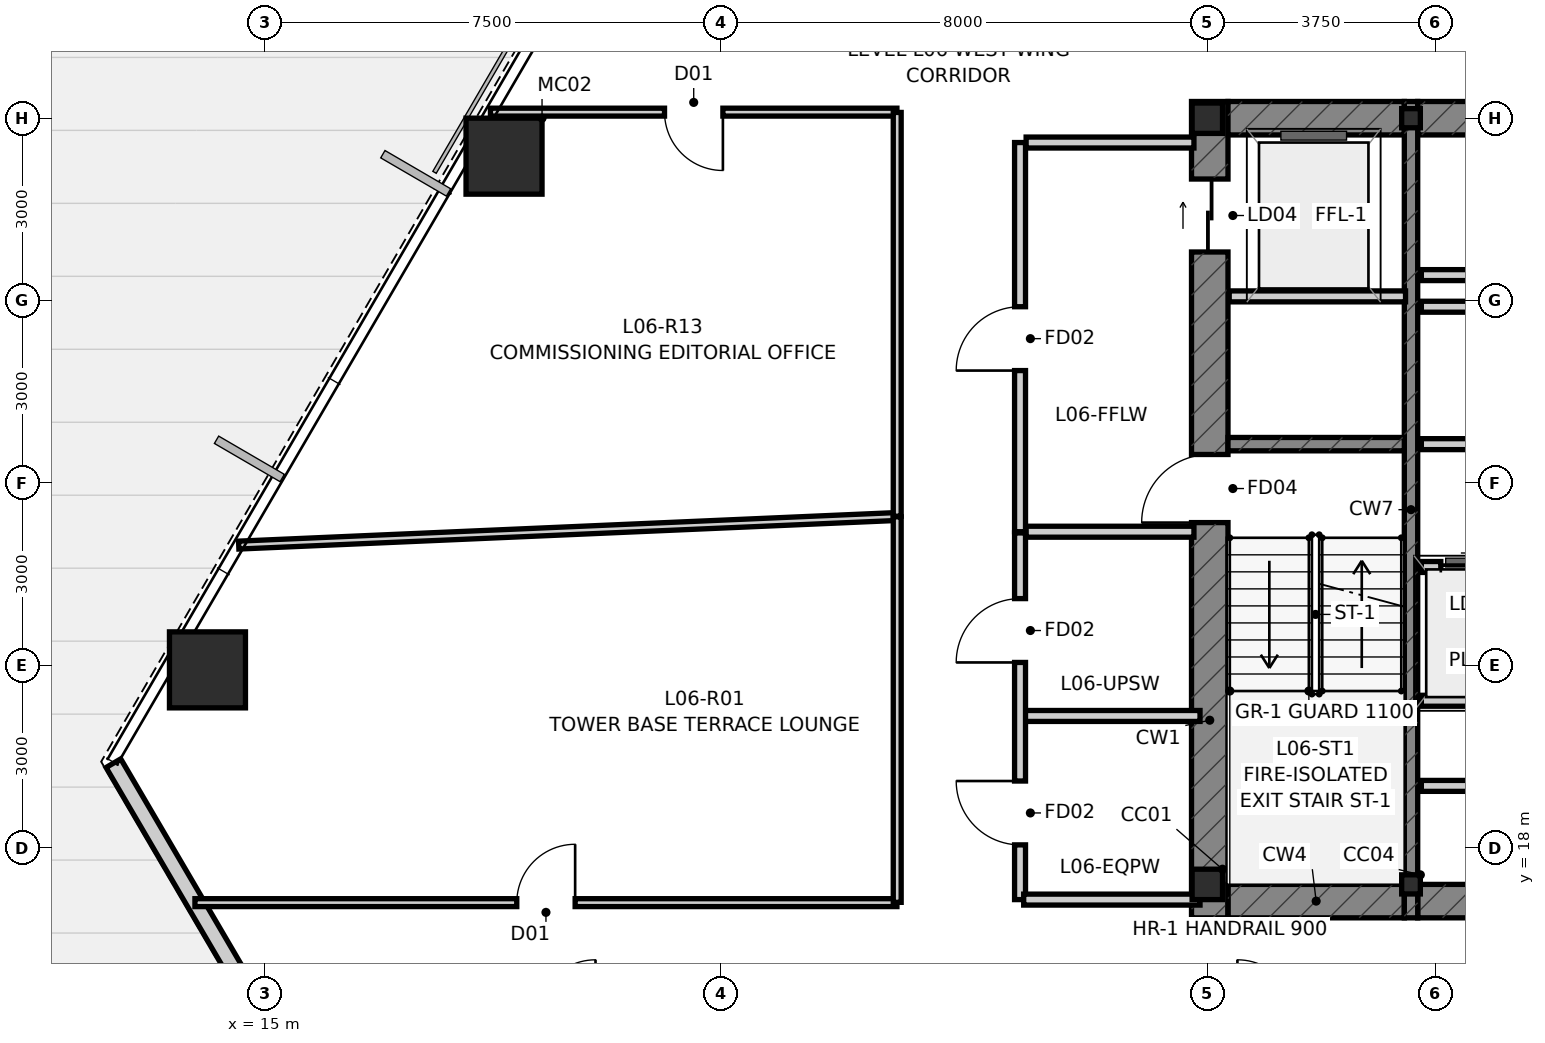
"""IFC4 building model, lengths in metres.
Left out: names, types, materials, properties, quantities, classifications, styles, units other than length and angle.
Written with IfcOpenShell. Run it as: python <this file> out.ifc"""

import sys

from ifc_helpers import new_model, si_unit, direction, frame, frame_2d, origin, origin_2d, place, context, subcontext, project, spatial, rectangle, hollow_rectangle, i_section, extrude, source, transform, mapped, element, fill, save


model = new_model("IFC4")
c1 = context("Model", 3, precision=1e-05, world=origin(), true_north=direction((0.0, 1.0)))
c2 = subcontext(c1, "Body", "Model", "MODEL_VIEW")
j1 = project(units=[si_unit("LENGTHUNIT", "METRE"), si_unit("PLANEANGLEUNIT", "RADIAN")], contexts=[c1])
p1 = place(None, origin())
s1 = spatial("IfcSite", under=j1, at=p1, CompositionType="ELEMENT")
p2 = place(p1, origin())
s2 = spatial("IfcBuilding", under=s1, at=p2, CompositionType="ELEMENT")
p3 = place(p2, frame((0.0, 0.0, 27.6)))
s3 = spatial("IfcBuildingStorey", under=s2, at=p3, CompositionType="ELEMENT", Elevation=27.6)
m1 = source(origin(), c2, "Body", "SweptSolid", [
    extrude(i_section(OverallWidth=0.5, OverallDepth=0.5, WebThickness=0.028, FlangeThickness=0.04, at=origin_2d()), origin(), (0.0, 0.0, 1.0), 3.65),
])
for number, where, z_axis, x_axis in (
    (1, (30.5, 17.4, 0.0), (0.0, 0.0, 1.0), (1.0, 0.0, 0.0)),
    (2, (30.5, 30.0, 0.0), (0.0, 0.0, 1.0), (1.0, 0.0, 0.0)),
):
    element("IfcColumn", number, at=place(p3, frame(where, z_axis=z_axis, x_axis=x_axis)), inside=s3, PredefinedType="COLUMN", context=c2, shape_type="MappedRepresentation", body=[
        mapped(m1, transform((0.0, 0.0, 0.0), scale=1.0)),
    ])
m2 = source(origin(), c2, "Body", "SweptSolid", [
    extrude(i_section(OverallWidth=0.307, OverallDepth=0.315, WebThickness=0.012, FlangeThickness=0.019, at=origin_2d()), origin(), (0.0, 0.0, 1.0), 3.65),
])
for number, where, z_axis, x_axis in (
    (3, (33.85, 17.4, 0.0), (0.0, 0.0, 1.0), (1.0, 0.0, 0.0)),
    (4, (33.85, 30.0, 0.0), (0.0, 0.0, 1.0), (1.0, 0.0, 0.0)),
):
    element("IfcColumn", number, at=place(p3, frame(where, z_axis=z_axis, x_axis=x_axis)), inside=s3, PredefinedType="COLUMN", context=c2, shape_type="MappedRepresentation", body=[
        mapped(m2, transform((0.0, 0.0, 0.0), scale=1.0)),
    ])
p4 = place(p3, frame((30.54, 16.85, 0.0), z_axis=(0.0, 0.0, 1.0), x_axis=(0.0, 1.0, 0.0)))
e5 = element("IfcWall", 5, at=p4, inside=s3, PredefinedType="SHEAR", context=c2, shape_type="SweptSolid", body=[
    extrude(rectangle(XDim=13.425, YDim=0.6, at=frame_2d((6.712, 0.0))), origin(), (0.0, 0.0, 1.0), 3.65),
])
p5 = place(p4, frame((6.5, 0.0, 0.0)))
e6 = element("IfcOpeningElement", 6, at=p5, cuts=e5, PredefinedType="OPENING", context=c2, shape_type="SweptSolid", body=[
    extrude(rectangle(XDim=1.12, YDim=2.15, at=frame_2d((0.56, 1.075))), frame((0.0, 0.312, 0.0), z_axis=(0.0, -1.0, 0.0), x_axis=(1.0, 0.0, 0.0)), (0.0, 0.0, 1.0), 0.624),
])
p6 = place(p4, frame((10.95, 0.0, 0.0)))
e7 = element("IfcOpeningElement", 7, at=p6, cuts=e5, PredefinedType="OPENING", context=c2, shape_type="SweptSolid", body=[
    extrude(rectangle(XDim=1.2, YDim=2.2, at=frame_2d((0.6, 1.1))), frame((0.0, 0.312, 0.0), z_axis=(0.0, -1.0, 0.0), x_axis=(1.0, 0.0, 0.0)), (0.0, 0.0, 1.0), 0.624),
])
p7 = place(p3, frame((30.84, 17.125, 0.0), z_axis=(0.0, 0.0, 1.0), x_axis=(1.0, 0.0, 0.0)))
e8 = element("IfcWall", 8, at=p7, inside=s3, PredefinedType="SHEAR", context=c2, shape_type="SweptSolid", body=[
    extrude(rectangle(XDim=2.9, YDim=0.55, at=frame_2d((1.45, 0.0))), origin(), (0.0, 0.0, 1.0), 3.65),
])
p8 = place(p3, frame((33.96, 17.125, 0.0), z_axis=(0.0, 0.0, 1.0), x_axis=(1.0, 0.0, 0.0)))
e9 = element("IfcWall", 9, at=p8, inside=s3, PredefinedType="SHEAR", context=c2, shape_type="SweptSolid", body=[
    extrude(rectangle(XDim=8.08, YDim=0.55, at=frame_2d((4.04, 0.0))), origin(), (0.0, 0.0, 1.0), 3.65),
])
p9 = place(p3, frame((30.84, 30.0, 0.0), z_axis=(0.0, 0.0, 1.0), x_axis=(1.0, 0.0, 0.0)))
e10 = element("IfcWall", 10, at=p9, inside=s3, PredefinedType="SHEAR", context=c2, shape_type="SweptSolid", body=[
    extrude(rectangle(XDim=2.9, YDim=0.55, at=frame_2d((1.45, 0.0))), origin(), (0.0, 0.0, 1.0), 3.65),
])
p10 = place(p3, frame((33.96, 30.0, 0.0), z_axis=(0.0, 0.0, 1.0), x_axis=(1.0, 0.0, 0.0)))
e11 = element("IfcWall", 11, at=p10, inside=s3, PredefinedType="SHEAR", context=c2, shape_type="SweptSolid", body=[
    extrude(rectangle(XDim=3.78, YDim=0.55, at=frame_2d((1.89, 0.0))), origin(), (0.0, 0.0, 1.0), 3.65),
])
p11 = place(p3, frame((33.85, 16.85, 0.0), z_axis=(0.0, 0.0, 1.0), x_axis=(0.0, 1.0, 0.0)))
e12 = element("IfcWall", 12, at=p11, inside=s3, PredefinedType="SHEAR", context=c2, shape_type="SweptSolid", body=[
    extrude(rectangle(XDim=13.425, YDim=0.22, at=frame_2d((6.712, 0.0))), origin(), (0.0, 0.0, 1.0), 3.65),
])
p12 = place(p3, frame((30.84, 24.64, 0.0), z_axis=(0.0, 0.0, 1.0), x_axis=(1.0, 0.0, 0.0)))
e13 = element("IfcWall", 13, at=p12, inside=s3, PredefinedType="SHEAR", context=c2, shape_type="SweptSolid", body=[
    extrude(rectangle(XDim=2.9, YDim=0.22, at=frame_2d((1.45, 0.0))), origin(), (0.0, 0.0, 1.0), 3.65),
])
m3 = source(origin(), c2, "Body", "SweptSolid", [
    extrude(hollow_rectangle(XDim=1.25, YDim=1.25, WallThickness=0.07, at=origin_2d()), origin(), (0.0, 0.0, 1.0), 3.651),
])
p13 = place(p3, frame((18.934, 29.376, 0.0), z_axis=(0.014913313399, -0.013776424037, 0.999793880369), x_axis=(0.678553674548, 0.734550822447, 0.0)))
e14 = element("IfcColumn", 14, at=p13, inside=s3, PredefinedType="COLUMN", context=c2, shape_type="MappedRepresentation", body=[
    mapped(m3, transform((0.0, 0.0, 0.0), scale=1.0)),
])
m4 = source(origin(), c2, "Body", "SweptSolid", [
    extrude(hollow_rectangle(XDim=1.25, YDim=1.25, WallThickness=0.07, at=origin_2d()), origin(), (0.0, 0.0, 1.0), 3.651),
])
p14 = place(p3, frame((14.056, 20.928, 0.0), z_axis=(0.010431795422, -0.021532295679, 0.999713727968), x_axis=(0.899947055326, 0.435999194506, 0.0)))
e15 = element("IfcColumn", 15, at=p14, inside=s3, PredefinedType="COLUMN", context=c2, shape_type="MappedRepresentation", body=[
    mapped(m4, transform((0.0, 0.0, 0.0), scale=1.0)),
])
p15 = place(p3, frame((21.466, 4.107, 0.0), z_axis=(0.0, 0.0, 1.0), x_axis=(-0.505539127034, 0.862803680473, 0.0)))
e16 = element("IfcWall", 16, at=p15, inside=s3, PredefinedType="STANDARD", context=c2, shape_type="SweptSolid", body=[
    extrude(rectangle(XDim=17.717, YDim=0.28, at=frame_2d((8.858, 0.0))), origin(), (0.0, 0.0, 1.0), 3.4),
])
p16 = place(p15, frame((7.96, 0.0, 0.9)))
e17 = element("IfcOpeningElement", 17, at=p16, cuts=e16, PredefinedType="OPENING", context=c2, shape_type="SweptSolid", body=[
    extrude(rectangle(XDim=1.8, YDim=1.8, at=frame_2d((0.9, 0.9))), frame((0.0, 0.152, 0.0), z_axis=(0.0, -1.0, 0.0), x_axis=(1.0, 0.0, 0.0)), (0.0, 0.0, 1.0), 0.304),
])
p17 = place(p3, frame((34.02, 22.62, 0.0), z_axis=(0.0, 0.0, 1.0), x_axis=(1.0, 0.0, 0.0)))
e18 = element("IfcWall", 18, at=p17, inside=s3, PredefinedType="PARTITIONING", context=c2, shape_type="SweptSolid", body=[
    extrude(rectangle(XDim=3.6, YDim=0.18, at=frame_2d((1.8, 0.0))), origin(), (0.0, 0.0, 1.0), 3.4),
])
p18 = place(p17, frame((0.32, 0.0, 0.0)))
e19 = element("IfcOpeningElement", 19, at=p18, cuts=e18, PredefinedType="OPENING", context=c2, shape_type="SweptSolid", body=[
    extrude(rectangle(XDim=1.1, YDim=2.2, at=frame_2d((0.55, 1.1))), frame((0.0, 0.102, 0.0), z_axis=(0.0, -1.0, 0.0), x_axis=(1.0, 0.0, 0.0)), (0.0, 0.0, 1.0), 0.204),
])
p19 = place(p17, frame((2.12, 0.0, 0.0)))
e20 = element("IfcOpeningElement", 20, at=p19, cuts=e18, PredefinedType="OPENING", context=c2, shape_type="SweptSolid", body=[
    extrude(rectangle(XDim=1.1, YDim=2.2, at=frame_2d((0.55, 1.1))), frame((0.0, 0.102, 0.0), z_axis=(0.0, -1.0, 0.0), x_axis=(1.0, 0.0, 0.0)), (0.0, 0.0, 1.0), 0.204),
])
p20 = place(p3, frame((34.02, 26.9, 0.0), z_axis=(0.0, 0.0, 1.0), x_axis=(1.0, 0.0, 0.0)))
e21 = element("IfcWall", 21, at=p20, inside=s3, PredefinedType="PARTITIONING", context=c2, shape_type="SweptSolid", body=[
    extrude(rectangle(XDim=3.6, YDim=0.18, at=frame_2d((1.8, 0.0))), origin(), (0.0, 0.0, 1.0), 3.4),
])
p21 = place(p3, frame((34.02, 24.64, 0.0), z_axis=(0.0, 0.0, 1.0), x_axis=(1.0, 0.0, 0.0)))
e22 = element("IfcWall", 22, at=p21, inside=s3, PredefinedType="PARTITIONING", context=c2, shape_type="SweptSolid", body=[
    extrude(rectangle(XDim=3.68, YDim=0.18, at=frame_2d((1.84, 0.0))), origin(), (0.0, 0.0, 1.0), 3.4),
])
p22 = place(p3, frame((34.02, 27.42, 0.0), z_axis=(0.0, 0.0, 1.0), x_axis=(1.0, 0.0, 0.0)))
e23 = element("IfcWall", 23, at=p22, inside=s3, PredefinedType="PARTITIONING", context=c2, shape_type="SweptSolid", body=[
    extrude(rectangle(XDim=3.66, YDim=0.18, at=frame_2d((1.83, 0.0))), origin(), (0.0, 0.0, 1.0), 3.4),
])
p23 = place(p3, frame((27.42, 23.2, 0.0), z_axis=(0.0, 0.0, 1.0), x_axis=(0.0, 1.0, 0.0)))
e24 = element("IfcWall", 24, at=p23, inside=s3, PredefinedType="PARTITIONING", context=c2, shape_type="SweptSolid", body=[
    extrude(rectangle(XDim=6.4, YDim=0.18, at=frame_2d((3.2, 0.0))), origin(), (0.0, 0.0, 1.0), 3.4),
])
p24 = place(p23, frame((2.65, 0.0, 0.0)))
e25 = element("IfcOpeningElement", 25, at=p24, cuts=e24, PredefinedType="OPENING", context=c2, shape_type="SweptSolid", body=[
    extrude(rectangle(XDim=1.05, YDim=2.15, at=frame_2d((0.525, 1.075))), frame((0.0, 0.102, 0.0), z_axis=(0.0, -1.0, 0.0), x_axis=(1.0, 0.0, 0.0)), (0.0, 0.0, 1.0), 0.204),
])
p25 = place(p3, frame((27.52, 23.2, 0.0), z_axis=(0.0, 0.0, 1.0), x_axis=(1.0, 0.0, 0.0)))
e26 = element("IfcWall", 26, at=p25, inside=s3, PredefinedType="PARTITIONING", context=c2, shape_type="SweptSolid", body=[
    extrude(rectangle(XDim=2.76, YDim=0.18, at=frame_2d((1.38, 0.0))), origin(), (0.0, 0.0, 1.0), 3.4),
])
p26 = place(p3, frame((27.52, 29.6, 0.0), z_axis=(0.0, 0.0, 1.0), x_axis=(1.0, 0.0, 0.0)))
e27 = element("IfcWall", 27, at=p26, inside=s3, PredefinedType="PARTITIONING", context=c2, shape_type="SweptSolid", body=[
    extrude(rectangle(XDim=2.76, YDim=0.18, at=frame_2d((1.38, 0.0))), origin(), (0.0, 0.0, 1.0), 2.783),
])
p27 = place(p3, frame((30.86, 27.07, 0.0), z_axis=(0.0, 0.0, 1.0), x_axis=(1.0, 0.0, 0.0)))
e28 = element("IfcWall", 28, at=p27, inside=s3, PredefinedType="PARTITIONING", context=c2, shape_type="SweptSolid", body=[
    extrude(rectangle(XDim=2.9, YDim=0.18, at=frame_2d((1.45, 0.0))), origin(), (0.0, 0.0, 1.0), 3.4),
])
p28 = place(p3, frame((34.02, 20.42, 0.0), z_axis=(0.0, 0.0, 1.0), x_axis=(1.0, 0.0, 0.0)))
e29 = element("IfcWall", 29, at=p28, inside=s3, PredefinedType="PARTITIONING", context=c2, shape_type="SweptSolid", body=[
    extrude(rectangle(XDim=3.64, YDim=0.18, at=frame_2d((1.82, 0.0))), origin(), (0.0, 0.0, 1.0), 3.4),
])
p29 = place(p3, frame((34.02, 19.02, 0.0), z_axis=(0.0, 0.0, 1.0), x_axis=(1.0, 0.0, 0.0)))
e30 = element("IfcWall", 30, at=p29, inside=s3, PredefinedType="PARTITIONING", context=c2, shape_type="SweptSolid", body=[
    extrude(rectangle(XDim=3.58, YDim=0.18, at=frame_2d((1.79, 0.0))), origin(), (0.0, 0.0, 1.0), 3.4),
])
p30 = place(p3, frame((27.48, 20.17, 0.0), z_axis=(0.0, 0.0, 1.0), x_axis=(1.0, 0.0, 0.0)))
e31 = element("IfcWall", 31, at=p30, inside=s3, PredefinedType="PARTITIONING", context=c2, shape_type="SweptSolid", body=[
    extrude(rectangle(XDim=2.9, YDim=0.18, at=frame_2d((1.45, 0.0))), origin(), (0.0, 0.0, 1.0), 3.4),
])
p31 = place(p3, frame((27.42, 17.15, 0.0), z_axis=(0.0, 0.0, 1.0), x_axis=(0.0, 1.0, 0.0)))
e32 = element("IfcWall", 32, at=p31, inside=s3, PredefinedType="PARTITIONING", context=c2, shape_type="SweptSolid", body=[
    extrude(rectangle(XDim=6.03, YDim=0.18, at=frame_2d((3.015, 0.0))), origin(), (0.0, 0.0, 1.0), 3.026),
])
p32 = place(p31, frame((0.9, 0.0, 0.0)))
e33 = element("IfcOpeningElement", 33, at=p32, cuts=e32, PredefinedType="OPENING", context=c2, shape_type="SweptSolid", body=[
    extrude(rectangle(XDim=1.05, YDim=2.15, at=frame_2d((0.525, 1.075))), frame((0.0, 0.102, 0.0), z_axis=(0.0, -1.0, 0.0), x_axis=(1.0, 0.0, 0.0)), (0.0, 0.0, 1.0), 0.204),
])
p33 = place(p31, frame((3.9, 0.0, 0.0)))
e34 = element("IfcOpeningElement", 34, at=p33, cuts=e32, PredefinedType="OPENING", context=c2, shape_type="SweptSolid", body=[
    extrude(rectangle(XDim=1.05, YDim=2.15, at=frame_2d((0.525, 1.075))), frame((0.0, 0.102, 0.0), z_axis=(0.0, -1.0, 0.0), x_axis=(1.0, 0.0, 0.0)), (0.0, 0.0, 1.0), 0.204),
])
p34 = place(p3, frame((27.48, 17.15, 0.0), z_axis=(0.0, 0.0, 1.0), x_axis=(1.0, 0.0, 0.0)))
e35 = element("IfcWall", 35, at=p34, inside=s3, PredefinedType="PARTITIONING", context=c2, shape_type="SweptSolid", body=[
    extrude(rectangle(XDim=2.9, YDim=0.18, at=frame_2d((1.45, 0.0))), origin(), (0.0, 0.0, 1.0), 2.783),
])
p35 = place(p3, frame((13.85, 17.1, 0.0), z_axis=(0.0, 0.0, 1.0), x_axis=(1.0, 0.0, 0.0)))
e36 = element("IfcWall", 36, at=p35, inside=s3, PredefinedType="PARTITIONING", context=c2, shape_type="SweptSolid", body=[
    extrude(rectangle(XDim=11.545, YDim=0.13, at=frame_2d((5.772, 0.0))), origin(), (0.0, 0.0, 1.0), 3.4),
])
p36 = place(p35, frame((5.293, 0.0, 0.0)))
e37 = element("IfcOpeningElement", 37, at=p36, cuts=e36, PredefinedType="OPENING", context=c2, shape_type="SweptSolid", body=[
    extrude(rectangle(XDim=0.96, YDim=2.15, at=frame_2d((0.48, 1.075))), frame((0.0, 0.077, 0.0), z_axis=(0.0, -1.0, 0.0), x_axis=(1.0, 0.0, 0.0)), (0.0, 0.0, 1.0), 0.154),
])
p37 = place(p3, frame((14.57, 22.98, 0.0), z_axis=(0.0, 0.0, 1.0), x_axis=(0.999058877274, 0.043374643965, 0.0)))
e38 = element("IfcWall", 38, at=p37, inside=s3, PredefinedType="PARTITIONING", context=c2, shape_type="SweptSolid", body=[
    extrude(rectangle(XDim=10.835, YDim=0.13, at=frame_2d((5.417, 0.0))), origin(), (0.0, 0.0, 1.0), 3.4),
])
p38 = place(p3, frame((25.395, 30.1, 0.0), z_axis=(0.0, 0.0, 1.0), x_axis=(-1.0, 0.0, 0.0)))
e39 = element("IfcWall", 39, at=p38, inside=s3, PredefinedType="PARTITIONING", context=c2, shape_type="SweptSolid", body=[
    extrude(rectangle(XDim=6.685, YDim=0.13, at=frame_2d((3.343, 0.0))), origin(), (0.0, 0.0, 1.0), 2.783),
])
p39 = place(p38, frame((2.862, 0.0, 0.0)))
e40 = element("IfcOpeningElement", 40, at=p39, cuts=e39, PredefinedType="OPENING", context=c2, shape_type="SweptSolid", body=[
    extrude(rectangle(XDim=0.96, YDim=2.15, at=frame_2d((0.48, 1.075))), frame((0.0, 0.077, 0.0), z_axis=(0.0, -1.0, 0.0), x_axis=(1.0, 0.0, 0.0)), (0.0, 0.0, 1.0), 0.154),
])
p40 = place(p3, frame((25.4, 23.455, 0.0), z_axis=(0.0, 0.0, 1.0), x_axis=(0.0, 1.0, 0.0)))
e41 = element("IfcWall", 41, at=p40, inside=s3, PredefinedType="PARTITIONING", context=c2, shape_type="SweptSolid", body=[
    extrude(rectangle(XDim=6.64, YDim=0.13, at=frame_2d((3.32, 0.0))), origin(), (0.0, 0.0, 1.0), 3.026),
])
p41 = place(p3, frame((25.4, 17.105, 0.0), z_axis=(0.0, 0.0, 1.0), x_axis=(0.0, 1.0, 0.0)))
e42 = element("IfcWall", 42, at=p41, inside=s3, PredefinedType="PARTITIONING", context=c2, shape_type="SweptSolid", body=[
    extrude(rectangle(XDim=6.34, YDim=0.13, at=frame_2d((3.17, 0.0))), origin(), (0.0, 0.0, 1.0), 3.026),
])
p42 = place(p5, origin())
e43 = element("IfcDoor", 43, at=p42, inside=s3, OperationType="SINGLE_SWING_LEFT", PredefinedType="DOOR", context=c2, shape_type="SweptSolid", body=[
    extrude(rectangle(XDim=1.12, YDim=2.15, at=frame_2d((0.56, 1.075))), frame((0.0, 0.025, 0.0), z_axis=(0.0, -1.0, 0.0), x_axis=(1.0, 0.0, 0.0)), (0.0, 0.0, 1.0), 0.05),
])
fill(e6, e43)
p43 = place(p6, origin())
e44 = element("IfcDoor", 44, at=p43, inside=s3, OperationType="SLIDING_TO_LEFT", PredefinedType="DOOR", context=c2, shape_type="SweptSolid", body=[
    extrude(rectangle(XDim=1.2, YDim=2.2, at=frame_2d((0.6, 1.1))), frame((0.0, 0.025, 0.0), z_axis=(0.0, -1.0, 0.0), x_axis=(1.0, 0.0, 0.0)), (0.0, 0.0, 1.0), 0.05),
])
fill(e7, e44)
p44 = place(p18, origin())
e45 = element("IfcDoor", 45, at=p44, inside=s3, OperationType="SLIDING_TO_LEFT", PredefinedType="DOOR", context=c2, shape_type="SweptSolid", body=[
    extrude(rectangle(XDim=1.1, YDim=2.2, at=frame_2d((0.55, 1.1))), frame((0.0, 0.025, 0.0), z_axis=(0.0, -1.0, 0.0), x_axis=(1.0, 0.0, 0.0)), (0.0, 0.0, 1.0), 0.05),
])
fill(e19, e45)
p45 = place(p24, origin())
e46 = element("IfcDoor", 46, at=p45, inside=s3, OperationType="SINGLE_SWING_LEFT", PredefinedType="DOOR", context=c2, shape_type="SweptSolid", body=[
    extrude(rectangle(XDim=1.05, YDim=2.15, at=frame_2d((0.525, 1.075))), frame((0.0, 0.025, 0.0), z_axis=(0.0, -1.0, 0.0), x_axis=(1.0, 0.0, 0.0)), (0.0, 0.0, 1.0), 0.05),
])
fill(e25, e46)
p46 = place(p32, origin())
e47 = element("IfcDoor", 47, at=p46, inside=s3, OperationType="SINGLE_SWING_RIGHT", PredefinedType="DOOR", context=c2, shape_type="SweptSolid", body=[
    extrude(rectangle(XDim=1.05, YDim=2.15, at=frame_2d((0.525, 1.075))), frame((0.0, 0.025, 0.0), z_axis=(0.0, -1.0, 0.0), x_axis=(1.0, 0.0, 0.0)), (0.0, 0.0, 1.0), 0.05),
])
fill(e33, e47)
p47 = place(p33, origin())
e48 = element("IfcDoor", 48, at=p47, inside=s3, OperationType="SINGLE_SWING_LEFT", PredefinedType="DOOR", context=c2, shape_type="SweptSolid", body=[
    extrude(rectangle(XDim=1.05, YDim=2.15, at=frame_2d((0.525, 1.075))), frame((0.0, 0.025, 0.0), z_axis=(0.0, -1.0, 0.0), x_axis=(1.0, 0.0, 0.0)), (0.0, 0.0, 1.0), 0.05),
])
fill(e34, e48)
p48 = place(p36, origin())
e49 = element("IfcDoor", 49, at=p48, inside=s3, OperationType="SINGLE_SWING_RIGHT", PredefinedType="DOOR", context=c2, shape_type="SweptSolid", body=[
    extrude(rectangle(XDim=0.96, YDim=2.15, at=frame_2d((0.48, 1.075))), frame((0.0, 0.025, 0.0), z_axis=(0.0, -1.0, 0.0), x_axis=(1.0, 0.0, 0.0)), (0.0, 0.0, 1.0), 0.05),
])
fill(e37, e49)
p49 = place(p39, origin())
e50 = element("IfcDoor", 50, at=p49, inside=s3, OperationType="SINGLE_SWING_LEFT", PredefinedType="DOOR", context=c2, shape_type="SweptSolid", body=[
    extrude(rectangle(XDim=0.96, YDim=2.15, at=frame_2d((0.48, 1.075))), frame((0.0, 0.025, 0.0), z_axis=(0.0, -1.0, 0.0), x_axis=(1.0, 0.0, 0.0)), (0.0, 0.0, 1.0), 0.05),
])
fill(e40, e50)
save(model, sys.argv[1])
